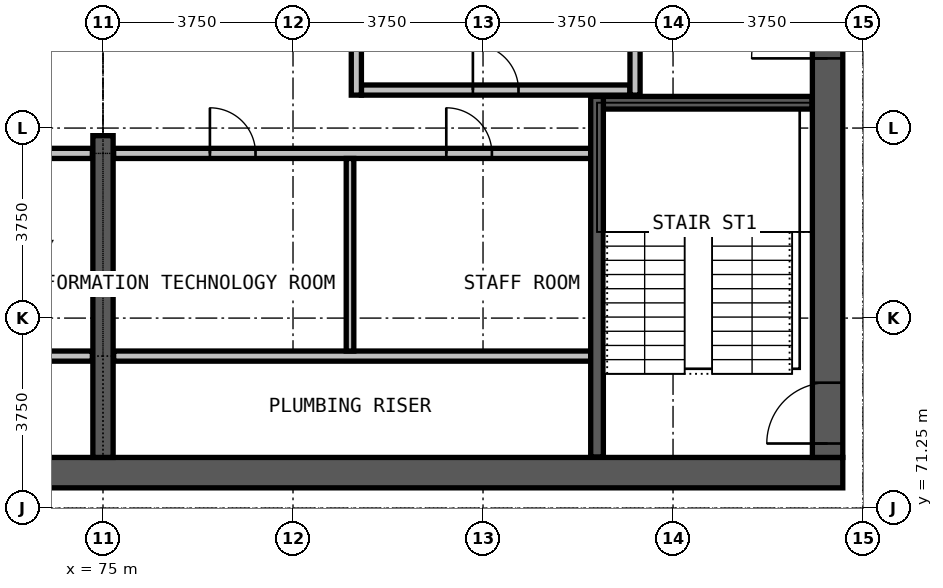
"""IFC4 building model, lengths in metres.
Left out: names, types, materials, properties, quantities, classifications, styles, units other than length and angle.
Written with IfcOpenShell. Run it as: python <this file> out.ifc"""

import sys

from ifc_helpers import new_model, si_unit, direction, frame, frame_2d, origin, place, context, subcontext, project, spatial, rectangle, extrude, element, fill, save


model = new_model("IFC4")
c1 = context("Model", 3, precision=1e-05, world=origin(), true_north=direction((0.0, 1.0)))
c2 = subcontext(c1, "Body", "Model", "MODEL_VIEW")
j1 = project(units=[si_unit("LENGTHUNIT", "METRE"), si_unit("PLANEANGLEUNIT", "RADIAN")], contexts=[c1])
p1 = place(None, origin())
s1 = spatial("IfcSite", under=j1, at=p1, CompositionType="ELEMENT")
p2 = place(p1, origin())
s2 = spatial("IfcBuilding", under=s1, at=p2, CompositionType="ELEMENT")
p3 = place(p2, frame((0.0, 0.0, 228.3)))
s3 = spatial("IfcBuildingStorey", under=s2, at=p3, CompositionType="ELEMENT", Elevation=228.3)
p4 = place(p3, frame((60.4, 71.95, 0.0), z_axis=(0.0, 0.0, 1.0), x_axis=(1.0, 0.0, 0.0)))
e1 = element("IfcWall", 1, at=p4, inside=s3, PredefinedType="SHEAR", context=c2, shape_type="SweptSolid", body=[
    extrude(rectangle(XDim=29.2, YDim=0.6, at=frame_2d((14.6, 0.0))), origin(), (0.0, 0.0, 1.0), 3.6),
])
p5 = place(p3, frame((89.3, 72.25, 0.0), z_axis=(0.0, 0.0, 1.0), x_axis=(0.0, 1.0, 0.0)))
e2 = element("IfcWall", 2, at=p5, inside=s3, PredefinedType="SHEAR", context=c2, shape_type="SweptSolid", body=[
    extrude(rectangle(XDim=20.5, YDim=0.6, at=frame_2d((10.25, 0.0))), origin(), (0.0, 0.0, 1.0), 3.6),
])
p6 = place(p5, frame((0.275, 0.0, 0.0)))
e3 = element("IfcOpeningElement", 3, at=p6, cuts=e2, PredefinedType="OPENING", context=c2, shape_type="SweptSolid", body=[
    extrude(rectangle(XDim=1.2, YDim=2.2, at=frame_2d((0.6, 1.1))), frame((0.0, 0.31, 0.0), z_axis=(0.0, -1.0, 0.0), x_axis=(1.0, 0.0, 0.0)), (0.0, 0.0, 1.0), 0.62),
])
p7 = place(p5, frame((13.775, 0.0, 0.0)))
e4 = element("IfcOpeningElement", 4, at=p7, cuts=e2, PredefinedType="OPENING", context=c2, shape_type="SweptSolid", body=[
    extrude(rectangle(XDim=1.2, YDim=2.2, at=frame_2d((0.6, 1.1))), frame((0.0, 0.31, 0.0), z_axis=(0.0, -1.0, 0.0), x_axis=(1.0, 0.0, 0.0)), (0.0, 0.0, 1.0), 0.62),
])
p8 = place(p5, frame((7.875, 0.0, 0.0)))
e5 = element("IfcOpeningElement", 5, at=p8, cuts=e2, PredefinedType="OPENING", context=c2, shape_type="SweptSolid", body=[
    extrude(rectangle(XDim=1.5, YDim=2.2, at=frame_2d((0.75, 1.1))), frame((0.0, 0.31, 0.0), z_axis=(0.0, -1.0, 0.0), x_axis=(1.0, 0.0, 0.0)), (0.0, 0.0, 1.0), 0.62),
])
p9 = place(p3, frame((75.0, 72.25, 0.0), z_axis=(0.0, 0.0, 1.0), x_axis=(0.0, 1.0, 0.0)))
e6 = element("IfcWall", 6, at=p9, inside=s3, PredefinedType="SHEAR", context=c2, shape_type="SweptSolid", body=[
    extrude(rectangle(XDim=6.35, YDim=0.4, at=frame_2d((3.175, 0.0))), origin(), (0.0, 0.0, 1.0), 3.6),
])
for number, where, z_axis, x_axis in (
    (7, (65.375, 74.25, 0.0), (0.0, 0.0, 1.0), (1.0, 0.0, 0.0)),
    (8, (75.21, 74.25, 0.0), (0.0, 0.0, 1.0), (1.0, 0.0, 0.0)),
):
    element("IfcWall", number, at=place(p3, frame(where, z_axis=z_axis, x_axis=x_axis)), inside=s3, PredefinedType="PARTITIONING", context=c2, shape_type="SweptSolid", body=[
        extrude(rectangle(XDim=9.415, YDim=0.2, at=frame_2d((4.708, 0.0))), origin(), (0.0, 0.0, 1.0), 3.3),
    ])
p10 = place(p3, frame((65.375, 78.25, 0.0), z_axis=(0.0, 0.0, 1.0), x_axis=(1.0, 0.0, 0.0)))
e9 = element("IfcWall", 9, at=p10, inside=s3, PredefinedType="PARTITIONING", context=c2, shape_type="SweptSolid", body=[
    extrude(rectangle(XDim=9.415, YDim=0.2, at=frame_2d((4.708, 0.0))), origin(), (0.0, 0.0, 1.0), 3.3),
])
p11 = place(p10, frame((1.0, 0.0, 0.0)))
e10 = element("IfcOpeningElement", 10, at=p11, cuts=e9, PredefinedType="OPENING", context=c2, shape_type="SweptSolid", body=[
    extrude(rectangle(XDim=0.9, YDim=2.2, at=frame_2d((0.45, 1.1))), frame((0.0, 0.11, 0.0), z_axis=(0.0, -1.0, 0.0), x_axis=(1.0, 0.0, 0.0)), (0.0, 0.0, 1.0), 0.22),
])
p12 = place(p10, frame((5.665, 0.0, 0.0)))
e11 = element("IfcOpeningElement", 11, at=p12, cuts=e9, PredefinedType="OPENING", context=c2, shape_type="SweptSolid", body=[
    extrude(rectangle(XDim=0.9, YDim=2.2, at=frame_2d((0.45, 1.1))), frame((0.0, 0.11, 0.0), z_axis=(0.0, -1.0, 0.0), x_axis=(1.0, 0.0, 0.0)), (0.0, 0.0, 1.0), 0.22),
])
p13 = place(p3, frame((75.21, 78.25, 0.0), z_axis=(0.0, 0.0, 1.0), x_axis=(1.0, 0.0, 0.0)))
e12 = element("IfcWall", 12, at=p13, inside=s3, PredefinedType="PARTITIONING", context=c2, shape_type="SweptSolid", body=[
    extrude(rectangle(XDim=9.415, YDim=0.2, at=frame_2d((4.708, 0.0))), origin(), (0.0, 0.0, 1.0), 3.3),
])
p14 = place(p13, frame((1.9, 0.0, 0.0)))
e13 = element("IfcOpeningElement", 13, at=p14, cuts=e12, PredefinedType="OPENING", context=c2, shape_type="SweptSolid", body=[
    extrude(rectangle(XDim=0.9, YDim=2.2, at=frame_2d((0.45, 1.1))), frame((0.0, 0.11, 0.0), z_axis=(0.0, -1.0, 0.0), x_axis=(1.0, 0.0, 0.0)), (0.0, 0.0, 1.0), 0.22),
])
p15 = place(p13, frame((6.565, 0.0, 0.0)))
e14 = element("IfcOpeningElement", 14, at=p15, cuts=e12, PredefinedType="OPENING", context=c2, shape_type="SweptSolid", body=[
    extrude(rectangle(XDim=0.9, YDim=2.2, at=frame_2d((0.45, 1.1))), frame((0.0, 0.11, 0.0), z_axis=(0.0, -1.0, 0.0), x_axis=(1.0, 0.0, 0.0)), (0.0, 0.0, 1.0), 0.22),
])
p16 = place(p3, frame((80.1, 79.5, 0.0), z_axis=(0.0, 0.0, 1.0), x_axis=(1.0, 0.0, 0.0)))
e15 = element("IfcWall", 15, at=p16, inside=s3, PredefinedType="PARTITIONING", context=c2, shape_type="SweptSolid", body=[
    extrude(rectangle(XDim=5.3, YDim=0.2, at=frame_2d((2.65, 0.0))), origin(), (0.0, 0.0, 1.0), 3.3),
])
p17 = place(p16, frame((2.2, 0.0, 0.0)))
e16 = element("IfcOpeningElement", 16, at=p17, cuts=e15, PredefinedType="OPENING", context=c2, shape_type="SweptSolid", body=[
    extrude(rectangle(XDim=0.9, YDim=2.2, at=frame_2d((0.45, 1.1))), frame((0.0, 0.11, 0.0), z_axis=(0.0, -1.0, 0.0), x_axis=(1.0, 0.0, 0.0)), (0.0, 0.0, 1.0), 0.22),
])
for number, where, z_axis, x_axis in (
    (17, (80.0, 79.4, 0.0), (0.0, 0.0, 1.0), (0.0, 1.0, 0.0)),
    (18, (85.5, 79.4, 0.0), (0.0, 0.0, 1.0), (0.0, 1.0, 0.0)),
):
    element("IfcWall", number, at=place(p3, frame(where, z_axis=z_axis, x_axis=x_axis)), inside=s3, PredefinedType="PARTITIONING", context=c2, shape_type="SweptSolid", body=[
        extrude(rectangle(XDim=2.89, YDim=0.2, at=frame_2d((1.445, 0.0))), origin(), (0.0, 0.0, 1.0), 3.3),
    ])
p18 = place(p3, frame((79.875, 74.35, 0.0), z_axis=(0.0, 0.0, 1.0), x_axis=(0.0, 1.0, 0.0)))
e19 = element("IfcWall", 19, at=p18, inside=s3, PredefinedType="PARTITIONING", context=c2, shape_type="SweptSolid", body=[
    extrude(rectangle(XDim=3.8, YDim=0.15, at=frame_2d((1.9, 0.0))), origin(), (0.0, 0.0, 1.0), 3.3),
])
p19 = place(p3, frame((84.875, 79.25, 0.0), z_axis=(0.0, 0.0, 1.0), x_axis=(1.0, 0.0, 0.0)))
e20 = element("IfcWall", 20, at=p19, inside=s3, PredefinedType="PARTITIONING", context=c2, shape_type="SweptSolid", body=[
    extrude(rectangle(XDim=4.115, YDim=0.25, at=frame_2d((2.058, 0.0))), origin(), (0.0, 0.0, 1.0), 3.3),
])
p20 = place(p3, frame((84.75, 72.26, 0.0), z_axis=(0.0, 0.0, 1.0), x_axis=(0.0, 1.0, 0.0)))
e21 = element("IfcWall", 21, at=p20, inside=s3, PredefinedType="PARTITIONING", context=c2, shape_type="SweptSolid", body=[
    extrude(rectangle(XDim=7.115, YDim=0.25, at=frame_2d((3.558, 0.0))), origin(), (0.0, 0.0, 1.0), 3.3),
])
p21 = place(p6, origin())
e22 = element("IfcDoor", 22, at=p21, inside=s3, OperationType="SINGLE_SWING_LEFT", PredefinedType="DOOR", context=c2, shape_type="SweptSolid", body=[
    extrude(rectangle(XDim=1.2, YDim=2.2, at=frame_2d((0.6, 1.1))), frame((0.0, 0.025, 0.0), z_axis=(0.0, -1.0, 0.0), x_axis=(1.0, 0.0, 0.0)), (0.0, 0.0, 1.0), 0.05),
])
fill(e3, e22)
p22 = place(p8, origin())
e23 = element("IfcDoor", 23, at=p22, inside=s3, OperationType="DOUBLE_DOOR_SINGLE_SWING", PredefinedType="DOOR", context=c2, shape_type="SweptSolid", body=[
    extrude(rectangle(XDim=1.5, YDim=2.2, at=frame_2d((0.75, 1.1))), frame((0.0, 0.025, 0.0), z_axis=(0.0, -1.0, 0.0), x_axis=(1.0, 0.0, 0.0)), (0.0, 0.0, 1.0), 0.05),
])
fill(e5, e23)
p23 = place(p17, origin())
e24 = element("IfcDoor", 24, at=p23, inside=s3, OperationType="SINGLE_SWING_LEFT", PredefinedType="DOOR", context=c2, shape_type="SweptSolid", body=[
    extrude(rectangle(XDim=0.9, YDim=2.2, at=frame_2d((0.45, 1.1))), frame((0.0, 0.025, 0.0), z_axis=(0.0, -1.0, 0.0), x_axis=(1.0, 0.0, 0.0)), (0.0, 0.0, 1.0), 0.05),
])
fill(e16, e24)
p24 = place(p14, origin())
e25 = element("IfcDoor", 25, at=p24, inside=s3, OperationType="SINGLE_SWING_LEFT", PredefinedType="DOOR", context=c2, shape_type="SweptSolid", body=[
    extrude(rectangle(XDim=0.9, YDim=2.2, at=frame_2d((0.45, 1.1))), frame((0.0, 0.025, 0.0), z_axis=(0.0, -1.0, 0.0), x_axis=(1.0, 0.0, 0.0)), (0.0, 0.0, 1.0), 0.05),
])
fill(e13, e25)
p25 = place(p15, origin())
e26 = element("IfcDoor", 26, at=p25, inside=s3, OperationType="SINGLE_SWING_LEFT", PredefinedType="DOOR", context=c2, shape_type="SweptSolid", body=[
    extrude(rectangle(XDim=0.9, YDim=2.2, at=frame_2d((0.45, 1.1))), frame((0.0, 0.025, 0.0), z_axis=(0.0, -1.0, 0.0), x_axis=(1.0, 0.0, 0.0)), (0.0, 0.0, 1.0), 0.05),
])
fill(e14, e26)
save(model, sys.argv[1])
